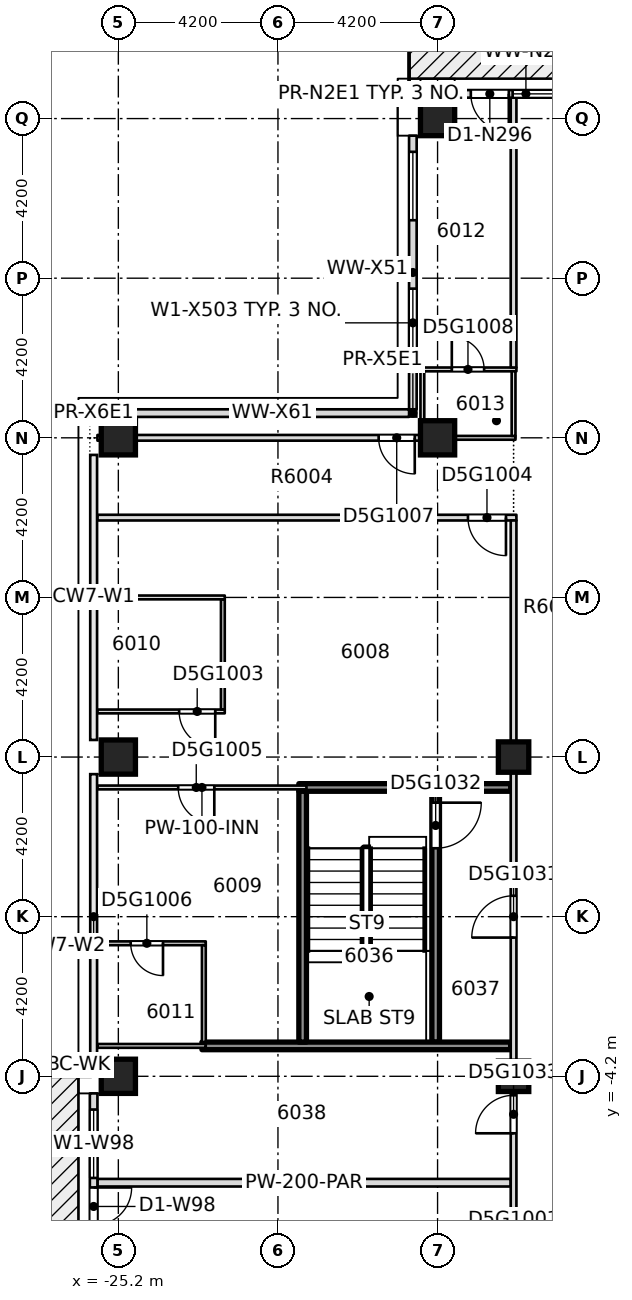
"""IFC4 building model, lengths in metres.
Left out: names, types, materials, properties, quantities, classifications, styles, units other than length and angle.
Written with IfcOpenShell. Run it as: python <this file> out.ifc"""

import sys

from ifc_helpers import new_model, si_unit, direction, frame, frame_2d, origin, origin_2d, place, context, subcontext, project, spatial, rectangle, extrude, element, fill, save


model = new_model("IFC4")
c1 = context("Model", 3, precision=1e-05, world=origin(), true_north=direction((0.0, 1.0)))
c2 = subcontext(c1, "Body", "Model", "MODEL_VIEW")
j1 = project(units=[si_unit("LENGTHUNIT", "METRE"), si_unit("PLANEANGLEUNIT", "RADIAN")], contexts=[c1])
p1 = place(None, origin())
s1 = spatial("IfcSite", under=j1, at=p1, CompositionType="ELEMENT")
p2 = place(p1, origin())
s2 = spatial("IfcBuilding", under=s1, at=p2, CompositionType="ELEMENT")
p3 = place(p2, frame((0.0, 0.0, 230.35)))
s3 = spatial("IfcBuildingStorey", under=s2, at=p3, CompositionType="ELEMENT", Elevation=230.35)
for number, where, z_axis, x_axis in (
    (1, (-25.2, -4.2, -0.4), (0.0, 0.0, 1.0), (1.0, 0.0, 0.0)),
    (2, (-25.2, 4.2, -0.4), (0.0, 0.0, 1.0), (1.0, 0.0, 0.0)),
    (3, (-25.2, 12.6, -0.4), (0.0, 0.0, 1.0), (1.0, 0.0, 0.0)),
    (4, (-16.8, 12.6, -0.4), (0.0, 0.0, 1.0), (1.0, 0.0, 0.0)),
    (5, (-16.8, 21.0, -0.4), (0.0, 0.0, 1.0), (1.0, 0.0, 0.0)),
):
    element("IfcColumn", number, at=place(p3, frame(where, z_axis=z_axis, x_axis=x_axis)), inside=s3, PredefinedType="COLUMN", context=c2, shape_type="SweptSolid", body=[
        extrude(rectangle(XDim=0.9, YDim=0.9, at=origin_2d()), origin(), (0.0, 0.0, 1.0), 3.45),
    ])
for number, where, z_axis, x_axis in (
    (6, (-14.8, -4.2, -0.4), (0.0, 0.0, 1.0), (1.0, 0.0, 0.0)),
    (7, (-14.8, 4.2, -0.4), (0.0, 0.0, 1.0), (1.0, 0.0, 0.0)),
):
    element("IfcColumn", number, at=place(p3, frame(where, z_axis=z_axis, x_axis=x_axis)), inside=s3, PredefinedType="COLUMN", context=c2, shape_type="SweptSolid", body=[
        extrude(rectangle(XDim=0.8, YDim=0.8, at=origin_2d()), origin(), (0.0, 0.0, 1.0), 3.45),
    ])
p4 = place(p3, frame((-25.75, -7.0, 0.0), z_axis=(0.0, 0.0, 1.0), x_axis=(1.0, 0.0, 0.0)))
e8 = element("IfcWall", 8, at=p4, inside=s3, PredefinedType="PARTITIONING", context=c2, shape_type="SweptSolid", body=[
    extrude(rectangle(XDim=10.875, YDim=0.2, at=frame_2d((5.438, 0.0))), origin(), (0.0, 0.0, 1.0), 3.05),
])
p5 = place(p3, frame((-25.75, -3.4, 0.0), z_axis=(0.0, 0.0, 1.0), x_axis=(1.0, 0.0, 0.0)))
e9 = element("IfcWall", 9, at=p5, inside=s3, PredefinedType="PARTITIONING", context=c2, shape_type="SweptSolid", body=[
    extrude(rectangle(XDim=2.85, YDim=0.1, at=frame_2d((1.425, 0.0))), origin(), (0.0, 0.0, 1.0), 3.05),
])
p6 = place(p3, frame((-25.75, -0.7, 0.0), z_axis=(0.0, 0.0, 1.0), x_axis=(1.0, 0.0, 0.0)))
e10 = element("IfcWall", 10, at=p6, inside=s3, PredefinedType="PARTITIONING", context=c2, shape_type="SweptSolid", body=[
    extrude(rectangle(XDim=2.85, YDim=0.1, at=frame_2d((1.425, 0.0))), origin(), (0.0, 0.0, 1.0), 3.05),
])
p7 = place(p6, frame((0.875, 0.0, 0.0)))
e11 = element("IfcOpeningElement", 11, at=p7, cuts=e10, PredefinedType="OPENING", context=c2, shape_type="SweptSolid", body=[
    extrude(rectangle(XDim=0.85, YDim=2.1, at=frame_2d((0.425, 1.05))), frame((0.0, 0.06, 0.0), z_axis=(0.0, -1.0, 0.0), x_axis=(1.0, 0.0, 0.0)), (0.0, 0.0, 1.0), 0.12),
])
p8 = place(p3, frame((-25.75, 3.4, 0.0), z_axis=(0.0, 0.0, 1.0), x_axis=(1.0, 0.0, 0.0)))
e12 = element("IfcWall", 12, at=p8, inside=s3, PredefinedType="PARTITIONING", context=c2, shape_type="SweptSolid", body=[
    extrude(rectangle(XDim=5.5, YDim=0.1, at=frame_2d((2.75, 0.0))), origin(), (0.0, 0.0, 1.0), 3.05),
])
p9 = place(p8, frame((2.125, 0.0, 0.0)))
e13 = element("IfcOpeningElement", 13, at=p9, cuts=e12, PredefinedType="OPENING", context=c2, shape_type="SweptSolid", body=[
    extrude(rectangle(XDim=0.95, YDim=2.1, at=frame_2d((0.475, 1.05))), frame((0.0, 0.06, 0.0), z_axis=(0.0, -1.0, 0.0), x_axis=(1.0, 0.0, 0.0)), (0.0, 0.0, 1.0), 0.12),
])
p10 = place(p3, frame((-20.45, 3.4, 0.0), z_axis=(0.0, 0.0, 1.0), x_axis=(1.0, 0.0, 0.0)))
e14 = element("IfcWall", 14, at=p10, inside=s3, PredefinedType="SOLIDWALL", context=c2, shape_type="SweptSolid", body=[
    extrude(rectangle(XDim=5.575, YDim=0.2, at=frame_2d((2.788, 0.0))), origin(), (0.0, 0.0, 1.0), 3.05),
])
p11 = place(p3, frame((-25.75, 5.4, 0.0), z_axis=(0.0, 0.0, 1.0), x_axis=(1.0, 0.0, 0.0)))
e15 = element("IfcWall", 15, at=p11, inside=s3, PredefinedType="PARTITIONING", context=c2, shape_type="SweptSolid", body=[
    extrude(rectangle(XDim=3.35, YDim=0.1, at=frame_2d((1.675, 0.0))), origin(), (0.0, 0.0, 1.0), 3.05),
])
p12 = place(p11, frame((2.15, 0.0, 0.0)))
e16 = element("IfcOpeningElement", 16, at=p12, cuts=e15, PredefinedType="OPENING", context=c2, shape_type="SweptSolid", body=[
    extrude(rectangle(XDim=0.95, YDim=2.1, at=frame_2d((0.475, 1.05))), frame((0.0, 0.06, 0.0), z_axis=(0.0, -1.0, 0.0), x_axis=(1.0, 0.0, 0.0)), (0.0, 0.0, 1.0), 0.12),
])
p13 = place(p3, frame((-25.75, 8.4, 0.0), z_axis=(0.0, 0.0, 1.0), x_axis=(1.0, 0.0, 0.0)))
e17 = element("IfcWall", 17, at=p13, inside=s3, PredefinedType="PARTITIONING", context=c2, shape_type="SweptSolid", body=[
    extrude(rectangle(XDim=3.35, YDim=0.1, at=frame_2d((1.675, 0.0))), origin(), (0.0, 0.0, 1.0), 3.05),
])
p14 = place(p3, frame((-25.75, 10.5, 0.0), z_axis=(0.0, 0.0, 1.0), x_axis=(1.0, 0.0, 0.0)))
e18 = element("IfcWall", 18, at=p14, inside=s3, PredefinedType="PARTITIONING", context=c2, shape_type="SweptSolid", body=[
    extrude(rectangle(XDim=11.025, YDim=0.15, at=frame_2d((5.512, 0.0))), origin(), (0.0, 0.0, 1.0), 3.05),
])
p15 = place(p14, frame((9.75, 0.0, 0.0)))
e19 = element("IfcOpeningElement", 19, at=p15, cuts=e18, PredefinedType="OPENING", context=c2, shape_type="SweptSolid", body=[
    extrude(rectangle(XDim=1.0, YDim=2.1, at=frame_2d((0.5, 1.05))), frame((0.0, 0.085, 0.0), z_axis=(0.0, -1.0, 0.0), x_axis=(1.0, 0.0, 0.0)), (0.0, 0.0, 1.0), 0.17),
])
p16 = place(p3, frame((-25.75, 12.6, 0.0), z_axis=(0.0, 0.0, 1.0), x_axis=(1.0, 0.0, 0.0)))
e20 = element("IfcWall", 20, at=p16, inside=s3, PredefinedType="PARTITIONING", context=c2, shape_type="SweptSolid", body=[
    extrude(rectangle(XDim=1.0, YDim=0.15, at=frame_2d((0.5, 0.0))), origin(), (0.0, 0.0, 1.0), 3.05),
])
p17 = place(p3, frame((-17.25, 12.6, 0.0), z_axis=(0.0, 0.0, 1.0), x_axis=(1.0, 0.0, 0.0)))
e21 = element("IfcWall", 21, at=p17, inside=s3, PredefinedType="PARTITIONING", context=c2, shape_type="SweptSolid", body=[
    extrude(rectangle(XDim=2.5, YDim=0.1, at=frame_2d((1.25, 0.0))), origin(), (0.0, 0.0, 1.0), 3.05),
])
p18 = place(p3, frame((-17.25, 14.4, 0.0), z_axis=(0.0, 0.0, 1.0), x_axis=(1.0, 0.0, 0.0)))
e22 = element("IfcWall", 22, at=p18, inside=s3, PredefinedType="PARTITIONING", context=c2, shape_type="SweptSolid", body=[
    extrude(rectangle(XDim=2.525, YDim=0.1, at=frame_2d((1.262, 0.0))), origin(), (0.0, 0.0, 1.0), 3.05),
])
p19 = place(p18, frame((0.825, 0.0, 0.0)))
e23 = element("IfcOpeningElement", 23, at=p19, cuts=e22, PredefinedType="OPENING", context=c2, shape_type="SweptSolid", body=[
    extrude(rectangle(XDim=0.85, YDim=2.1, at=frame_2d((0.425, 1.05))), frame((0.0, 0.06, 0.0), z_axis=(0.0, -1.0, 0.0), x_axis=(1.0, 0.0, 0.0)), (0.0, 0.0, 1.0), 0.12),
])
p20 = place(p3, frame((-22.95, -3.3, 0.0), z_axis=(0.0, 0.0, 1.0), x_axis=(0.0, 1.0, 0.0)))
e24 = element("IfcWall", 24, at=p20, inside=s3, PredefinedType="PARTITIONING", context=c2, shape_type="SweptSolid", body=[
    extrude(rectangle(XDim=2.55, YDim=0.1, at=frame_2d((1.275, 0.0))), origin(), (0.0, 0.0, 1.0), 3.05),
])
p21 = place(p3, frame((-22.45, 5.45, 0.0), z_axis=(0.0, 0.0, 1.0), x_axis=(0.0, 1.0, 0.0)))
e25 = element("IfcWall", 25, at=p21, inside=s3, PredefinedType="PARTITIONING", context=c2, shape_type="SweptSolid", body=[
    extrude(rectangle(XDim=2.9, YDim=0.1, at=frame_2d((1.45, 0.0))), origin(), (0.0, 0.0, 1.0), 3.05),
])
p22 = place(p3, frame((-17.2, 12.675, 0.0), z_axis=(0.0, 0.0, 1.0), x_axis=(0.0, 1.0, 0.0)))
e26 = element("IfcWall", 26, at=p22, inside=s3, PredefinedType="PARTITIONING", context=c2, shape_type="SweptSolid", body=[
    extrude(rectangle(XDim=1.675, YDim=0.1, at=frame_2d((0.837, 0.0))), origin(), (0.0, 0.0, 1.0), 3.05),
])
p23 = place(p3, frame((-16.85, -3.3, 0.0), z_axis=(0.0, 0.0, 1.0), x_axis=(0.0, 1.0, 0.0)))
e27 = element("IfcWall", 27, at=p23, inside=s3, PredefinedType="SOLIDWALL", context=c2, shape_type="SweptSolid", body=[
    extrude(rectangle(XDim=6.6, YDim=0.2, at=frame_2d((3.3, 0.0))), origin(), (0.0, 0.0, 1.0), 3.05),
])
p24 = place(p23, frame((5.1, 0.0, 0.0)))
e28 = element("IfcOpeningElement", 28, at=p24, cuts=e27, PredefinedType="OPENING", context=c2, shape_type="SweptSolid", body=[
    extrude(rectangle(XDim=1.2, YDim=2.1, at=frame_2d((0.6, 1.05))), frame((0.0, 0.11, 0.0), z_axis=(0.0, -1.0, 0.0), x_axis=(1.0, 0.0, 0.0)), (0.0, 0.0, 1.0), 0.22),
])
p25 = place(p3, frame((-14.8, -10.38, 0.0), z_axis=(0.0, 0.0, 1.0), x_axis=(0.0, 1.0, 0.0)))
e29 = element("IfcWall", 29, at=p25, inside=s3, PredefinedType="PARTITIONING", context=c2, shape_type="SweptSolid", body=[
    extrude(rectangle(XDim=20.805, YDim=0.15, at=frame_2d((10.402, 0.0))), origin(), (0.0, 0.0, 1.0), 3.05),
])
p26 = place(p25, frame((0.83, 0.0, 0.0)))
e30 = element("IfcOpeningElement", 30, at=p26, cuts=e29, PredefinedType="OPENING", context=c2, shape_type="SweptSolid", body=[
    extrude(rectangle(XDim=0.95, YDim=2.1, at=frame_2d((0.475, 1.05))), frame((0.0, 0.085, 0.0), z_axis=(0.0, -1.0, 0.0), x_axis=(1.0, 0.0, 0.0)), (0.0, 0.0, 1.0), 0.17),
])
p27 = place(p25, frame((9.83, 0.0, 0.0)))
e31 = element("IfcOpeningElement", 31, at=p27, cuts=e29, PredefinedType="OPENING", context=c2, shape_type="SweptSolid", body=[
    extrude(rectangle(XDim=1.1, YDim=2.1, at=frame_2d((0.55, 1.05))), frame((0.0, 0.085, 0.0), z_axis=(0.0, -1.0, 0.0), x_axis=(1.0, 0.0, 0.0)), (0.0, 0.0, 1.0), 0.17),
])
p28 = place(p25, frame((4.68, 0.0, 0.0)))
e32 = element("IfcOpeningElement", 32, at=p28, cuts=e29, PredefinedType="OPENING", context=c2, shape_type="SweptSolid", body=[
    extrude(rectangle(XDim=1.0, YDim=2.1, at=frame_2d((0.5, 1.05))), frame((0.0, 0.085, 0.0), z_axis=(0.0, -1.0, 0.0), x_axis=(1.0, 0.0, 0.0)), (0.0, 0.0, 1.0), 0.17),
])
p29 = place(p3, frame((-14.8, 12.65, 0.0), z_axis=(0.0, 0.0, 1.0), x_axis=(0.0, 1.0, 0.0)))
e33 = element("IfcWall", 33, at=p29, inside=s3, PredefinedType="PARTITIONING", context=c2, shape_type="SweptSolid", body=[
    extrude(rectangle(XDim=1.7, YDim=0.1, at=frame_2d((0.85, 0.0))), origin(), (0.0, 0.0, 1.0), 3.05),
])
p30 = place(p3, frame((-14.8, 14.45, 0.0), z_axis=(0.0, 0.0, 1.0), x_axis=(0.0, 1.0, 0.0)))
e34 = element("IfcWall", 34, at=p30, inside=s3, PredefinedType="PARTITIONING", context=c2, shape_type="SweptSolid", body=[
    extrude(rectangle(XDim=7.1, YDim=0.15, at=frame_2d((3.55, 0.0))), origin(), (0.0, 0.0, 1.0), 3.05),
])
p31 = place(p3, frame((-12.6, 21.65, 0.0), z_axis=(0.0, 0.0, 1.0), x_axis=(-1.0, 0.0, 0.0)))
e35 = element("IfcWall", 35, at=p31, inside=s3, PredefinedType="STANDARD", context=c2, shape_type="SweptSolid", body=[
    extrude(rectangle(XDim=3.75, YDim=0.2, at=frame_2d((1.875, 0.0))), origin(), (0.0, 0.0, 1.0), 3.05),
])
p32 = place(p31, frame((0.425, 0.0, 0.2)))
e36 = element("IfcOpeningElement", 36, at=p32, cuts=e35, PredefinedType="OPENING", context=c2, shape_type="SweptSolid", body=[
    extrude(rectangle(XDim=1.8, YDim=2.65, at=frame_2d((0.9, 1.325))), frame((0.0, 0.11, 0.0), z_axis=(0.0, -1.0, 0.0), x_axis=(1.0, 0.0, 0.0)), (0.0, 0.0, 1.0), 0.22),
])
p33 = place(p31, frame((2.325, 0.0, 0.0)))
e37 = element("IfcOpeningElement", 37, at=p33, cuts=e35, PredefinedType="OPENING", context=c2, shape_type="SweptSolid", body=[
    extrude(rectangle(XDim=1.0, YDim=2.4, at=frame_2d((0.5, 1.2))), frame((0.0, 0.11, 0.0), z_axis=(0.0, -1.0, 0.0), x_axis=(1.0, 0.0, 0.0)), (0.0, 0.0, 1.0), 0.22),
])
p34 = place(p3, frame((-17.45, 20.55, 0.0), z_axis=(0.0, 0.0, 1.0), x_axis=(0.0, -1.0, 0.0)))
e38 = element("IfcWall", 38, at=p34, inside=s3, PredefinedType="STANDARD", context=c2, shape_type="SweptSolid", body=[
    extrude(rectangle(XDim=7.2, YDim=0.2, at=frame_2d((3.6, 0.0))), origin(), (0.0, 0.0, 1.0), 3.05),
])
p35 = place(p34, frame((4.025, 0.0, 0.2)))
e39 = element("IfcOpeningElement", 39, at=p35, cuts=e38, PredefinedType="OPENING", context=c2, shape_type="SweptSolid", body=[
    extrude(rectangle(XDim=1.8, YDim=2.65, at=frame_2d((0.9, 1.325))), frame((0.0, 0.11, 0.0), z_axis=(0.0, -1.0, 0.0), x_axis=(1.0, 0.0, 0.0)), (0.0, 0.0, 1.0), 0.22),
])
p36 = place(p34, frame((0.425, 0.0, 0.2)))
e40 = element("IfcOpeningElement", 40, at=p36, cuts=e38, PredefinedType="OPENING", context=c2, shape_type="SweptSolid", body=[
    extrude(rectangle(XDim=1.8, YDim=2.65, at=frame_2d((0.9, 1.325))), frame((0.0, 0.11, 0.0), z_axis=(0.0, -1.0, 0.0), x_axis=(1.0, 0.0, 0.0)), (0.0, 0.0, 1.0), 0.22),
])
p37 = place(p3, frame((-17.55, 13.25, 0.0), z_axis=(0.0, 0.0, 1.0), x_axis=(-1.0, 0.0, 0.0)))
e41 = element("IfcWall", 41, at=p37, inside=s3, PredefinedType="STANDARD", context=c2, shape_type="SweptSolid", body=[
    extrude(rectangle(XDim=7.2, YDim=0.2, at=frame_2d((3.6, 0.0))), origin(), (0.0, 0.0, 1.0), 3.05),
])
p38 = place(p3, frame((-25.85, -4.65, 0.0), z_axis=(0.0, 0.0, 1.0), x_axis=(0.0, -1.0, 0.0)))
e42 = element("IfcWall", 42, at=p38, inside=s3, PredefinedType="STANDARD", context=c2, shape_type="SweptSolid", body=[
    extrude(rectangle(XDim=7.5, YDim=0.2, at=frame_2d((3.75, 0.0))), origin(), (0.0, 0.0, 1.0), 3.05),
])
p39 = place(p38, frame((4.175, 0.0, 0.2)))
e43 = element("IfcOpeningElement", 43, at=p39, cuts=e42, PredefinedType="OPENING", context=c2, shape_type="SweptSolid", body=[
    extrude(rectangle(XDim=1.8, YDim=2.65, at=frame_2d((0.9, 1.325))), frame((0.0, 0.11, 0.0), z_axis=(0.0, -1.0, 0.0), x_axis=(1.0, 0.0, 0.0)), (0.0, 0.0, 1.0), 0.22),
])
p40 = place(p38, frame((6.075, 0.0, 0.0)))
e44 = element("IfcOpeningElement", 44, at=p40, cuts=e42, PredefinedType="OPENING", context=c2, shape_type="SweptSolid", body=[
    extrude(rectangle(XDim=1.0, YDim=2.4, at=frame_2d((0.5, 1.2))), frame((0.0, 0.11, 0.0), z_axis=(0.0, -1.0, 0.0), x_axis=(1.0, 0.0, 0.0)), (0.0, 0.0, 1.0), 0.22),
])
p41 = place(p38, frame((0.425, 0.0, 0.2)))
e45 = element("IfcOpeningElement", 45, at=p41, cuts=e42, PredefinedType="OPENING", context=c2, shape_type="SweptSolid", body=[
    extrude(rectangle(XDim=1.8, YDim=2.65, at=frame_2d((0.9, 1.325))), frame((0.0, 0.11, 0.0), z_axis=(0.0, -1.0, 0.0), x_axis=(1.0, 0.0, 0.0)), (0.0, 0.0, 1.0), 0.22),
])
p42 = place(p38, frame((2.475, 0.0, 0.0)))
e46 = element("IfcOpeningElement", 46, at=p42, cuts=e42, PredefinedType="OPENING", context=c2, shape_type="SweptSolid", body=[
    extrude(rectangle(XDim=1.0, YDim=2.4, at=frame_2d((0.5, 1.2))), frame((0.0, 0.11, 0.0), z_axis=(0.0, -1.0, 0.0), x_axis=(1.0, 0.0, 0.0)), (0.0, 0.0, 1.0), 0.22),
])
p43 = place(p3, frame((-23.0, -3.4, 0.0), z_axis=(0.0, 0.0, 1.0), x_axis=(1.0, 0.0, 0.0)))
e47 = element("IfcWall", 47, at=p43, inside=s3, PredefinedType="SOLIDWALL", context=c2, shape_type="SweptSolid", body=[
    extrude(rectangle(XDim=8.123, YDim=0.2, at=frame_2d((4.062, 0.0))), origin(), (0.0, 0.0, 1.0), 3.05),
])
p44 = place(p3, frame((-20.35, -3.3, 0.0), z_axis=(0.0, 0.0, 1.0), x_axis=(0.0, 1.0, 0.0)))
e48 = element("IfcWall", 48, at=p44, inside=s3, PredefinedType="SOLIDWALL", context=c2, shape_type="SweptSolid", body=[
    extrude(rectangle(XDim=6.6, YDim=0.2, at=frame_2d((3.3, 0.0))), origin(), (0.0, 0.0, 1.0), 3.05),
])
p45 = place(p3, frame((-24.75, 12.6, 0.0), z_axis=(0.0, 0.0, 1.0), x_axis=(1.0, 0.0, 0.0)))
e49 = element("IfcWall", 49, at=p45, inside=s3, PredefinedType="PARTITIONING", context=c2, shape_type="SweptSolid", body=[
    extrude(rectangle(XDim=7.5, YDim=0.15, at=frame_2d((3.75, 0.0))), origin(), (0.0, 0.0, 1.0), 2.5),
])
p46 = place(p45, frame((6.4, 0.0, 0.0)))
e50 = element("IfcOpeningElement", 50, at=p46, cuts=e49, PredefinedType="OPENING", context=c2, shape_type="SweptSolid", body=[
    extrude(rectangle(XDim=0.95, YDim=2.1, at=frame_2d((0.475, 1.05))), frame((0.0, 0.085, 0.0), z_axis=(0.0, -1.0, 0.0), x_axis=(1.0, 0.0, 0.0)), (0.0, 0.0, 1.0), 0.17),
])
p47 = place(p3, frame((-17.25, 12.6, 0.0), z_axis=(0.0, 0.0, 1.0), x_axis=(1.0, 0.0, 0.0)))
e51 = element("IfcWall", 51, at=p47, inside=s3, PredefinedType="PARTITIONING", context=c2, shape_type="SweptSolid", body=[
    extrude(rectangle(XDim=0.1, YDim=0.15, at=frame_2d((0.05, 0.0))), origin(), (0.0, 0.0, 1.0), 3.05),
])
p48 = place(p12, origin())
e52 = element("IfcDoor", 52, at=p48, inside=s3, OperationType="SINGLE_SWING_RIGHT", PredefinedType="DOOR", context=c2, shape_type="SweptSolid", body=[
    extrude(rectangle(XDim=0.95, YDim=2.1, at=frame_2d((0.475, 1.05))), frame((0.0, 0.025, 0.0), z_axis=(0.0, -1.0, 0.0), x_axis=(1.0, 0.0, 0.0)), (0.0, 0.0, 1.0), 0.05),
])
fill(e16, e52)
p49 = place(p15, origin())
e53 = element("IfcDoor", 53, at=p49, inside=s3, OperationType="SINGLE_SWING_RIGHT", PredefinedType="DOOR", context=c2, shape_type="SweptSolid", body=[
    extrude(rectangle(XDim=1.0, YDim=2.1, at=frame_2d((0.5, 1.05))), frame((0.0, 0.025, 0.0), z_axis=(0.0, -1.0, 0.0), x_axis=(1.0, 0.0, 0.0)), (0.0, 0.0, 1.0), 0.05),
])
fill(e19, e53)
p50 = place(p9, origin())
e54 = element("IfcDoor", 54, at=p50, inside=s3, OperationType="SINGLE_SWING_LEFT", PredefinedType="DOOR", context=c2, shape_type="SweptSolid", body=[
    extrude(rectangle(XDim=0.95, YDim=2.1, at=frame_2d((0.475, 1.05))), frame((0.0, 0.025, 0.0), z_axis=(0.0, -1.0, 0.0), x_axis=(1.0, 0.0, 0.0)), (0.0, 0.0, 1.0), 0.05),
])
fill(e13, e54)
p51 = place(p7, origin())
e55 = element("IfcDoor", 55, at=p51, inside=s3, OperationType="SINGLE_SWING_RIGHT", PredefinedType="DOOR", context=c2, shape_type="SweptSolid", body=[
    extrude(rectangle(XDim=0.85, YDim=2.1, at=frame_2d((0.425, 1.05))), frame((0.0, 0.025, 0.0), z_axis=(0.0, -1.0, 0.0), x_axis=(1.0, 0.0, 0.0)), (0.0, 0.0, 1.0), 0.05),
])
fill(e11, e55)
p52 = place(p46, origin())
e56 = element("IfcDoor", 56, at=p52, inside=s3, OperationType="SINGLE_SWING_LEFT", PredefinedType="DOOR", context=c2, shape_type="SweptSolid", body=[
    extrude(rectangle(XDim=0.95, YDim=2.1, at=frame_2d((0.475, 1.05))), frame((0.0, 0.025, 0.0), z_axis=(0.0, -1.0, 0.0), x_axis=(1.0, 0.0, 0.0)), (0.0, 0.0, 1.0), 0.05),
])
fill(e50, e56)
p53 = place(p19, origin())
e57 = element("IfcDoor", 57, at=p53, inside=s3, OperationType="SINGLE_SWING_RIGHT", PredefinedType="DOOR", context=c2, shape_type="SweptSolid", body=[
    extrude(rectangle(XDim=0.85, YDim=2.1, at=frame_2d((0.425, 1.05))), frame((0.0, 0.025, 0.0), z_axis=(0.0, -1.0, 0.0), x_axis=(1.0, 0.0, 0.0)), (0.0, 0.0, 1.0), 0.05),
])
fill(e23, e57)
p54 = place(p27, origin())
e58 = element("IfcDoor", 58, at=p54, inside=s3, OperationType="SINGLE_SWING_RIGHT", PredefinedType="DOOR", context=c2, shape_type="SweptSolid", body=[
    extrude(rectangle(XDim=1.1, YDim=2.1, at=frame_2d((0.55, 1.05))), frame((0.0, 0.025, 0.0), z_axis=(0.0, -1.0, 0.0), x_axis=(1.0, 0.0, 0.0)), (0.0, 0.0, 1.0), 0.05),
])
fill(e31, e58)
p55 = place(p24, origin())
e59 = element("IfcDoor", 59, at=p55, inside=s3, OperationType="SINGLE_SWING_RIGHT", PredefinedType="DOOR", context=c2, shape_type="SweptSolid", body=[
    extrude(rectangle(XDim=1.2, YDim=2.1, at=frame_2d((0.6, 1.05))), frame((0.0, 0.025, 0.0), z_axis=(0.0, -1.0, 0.0), x_axis=(1.0, 0.0, 0.0)), (0.0, 0.0, 1.0), 0.05),
])
fill(e28, e59)
p56 = place(p28, origin())
e60 = element("IfcDoor", 60, at=p56, inside=s3, OperationType="SINGLE_SWING_LEFT", PredefinedType="DOOR", context=c2, shape_type="SweptSolid", body=[
    extrude(rectangle(XDim=1.0, YDim=2.1, at=frame_2d((0.5, 1.05))), frame((0.0, 0.025, 0.0), z_axis=(0.0, -1.0, 0.0), x_axis=(1.0, 0.0, 0.0)), (0.0, 0.0, 1.0), 0.05),
])
fill(e32, e60)
p57 = place(p32, origin())
e61 = element("IfcWindow", 61, at=p57, inside=s3, PartitioningType="SINGLE_PANEL", PredefinedType="WINDOW", context=c2, shape_type="SweptSolid", body=[
    extrude(rectangle(XDim=1.8, YDim=2.65, at=frame_2d((0.9, 1.325))), frame((0.0, 0.03, 0.0), z_axis=(0.0, -1.0, 0.0), x_axis=(1.0, 0.0, 0.0)), (0.0, 0.0, 1.0), 0.06),
])
fill(e36, e61)
p58 = place(p33, origin())
e62 = element("IfcDoor", 62, at=p58, inside=s3, OperationType="SINGLE_SWING_LEFT", PredefinedType="DOOR", context=c2, shape_type="SweptSolid", body=[
    extrude(rectangle(XDim=1.0, YDim=2.4, at=frame_2d((0.5, 1.2))), frame((0.0, 0.025, 0.0), z_axis=(0.0, -1.0, 0.0), x_axis=(1.0, 0.0, 0.0)), (0.0, 0.0, 1.0), 0.05),
])
fill(e37, e62)
p59 = place(p35, origin())
e63 = element("IfcWindow", 63, at=p59, inside=s3, PartitioningType="SINGLE_PANEL", PredefinedType="WINDOW", context=c2, shape_type="SweptSolid", body=[
    extrude(rectangle(XDim=1.8, YDim=2.65, at=frame_2d((0.9, 1.325))), frame((0.0, 0.03, 0.0), z_axis=(0.0, -1.0, 0.0), x_axis=(1.0, 0.0, 0.0)), (0.0, 0.0, 1.0), 0.06),
])
fill(e39, e63)
p60 = place(p36, origin())
e64 = element("IfcWindow", 64, at=p60, inside=s3, PartitioningType="SINGLE_PANEL", PredefinedType="WINDOW", context=c2, shape_type="SweptSolid", body=[
    extrude(rectangle(XDim=1.8, YDim=2.65, at=frame_2d((0.9, 1.325))), frame((0.0, 0.03, 0.0), z_axis=(0.0, -1.0, 0.0), x_axis=(1.0, 0.0, 0.0)), (0.0, 0.0, 1.0), 0.06),
])
fill(e40, e64)
p61 = place(p41, origin())
e65 = element("IfcWindow", 65, at=p61, inside=s3, PartitioningType="SINGLE_PANEL", PredefinedType="WINDOW", context=c2, shape_type="SweptSolid", body=[
    extrude(rectangle(XDim=1.8, YDim=2.65, at=frame_2d((0.9, 1.325))), frame((0.0, 0.03, 0.0), z_axis=(0.0, -1.0, 0.0), x_axis=(1.0, 0.0, 0.0)), (0.0, 0.0, 1.0), 0.06),
])
fill(e45, e65)
p62 = place(p42, origin())
e66 = element("IfcDoor", 66, at=p62, inside=s3, OperationType="SINGLE_SWING_LEFT", PredefinedType="DOOR", context=c2, shape_type="SweptSolid", body=[
    extrude(rectangle(XDim=1.0, YDim=2.4, at=frame_2d((0.5, 1.2))), frame((0.0, 0.025, 0.0), z_axis=(0.0, -1.0, 0.0), x_axis=(1.0, 0.0, 0.0)), (0.0, 0.0, 1.0), 0.05),
])
fill(e46, e66)
save(model, sys.argv[1])
